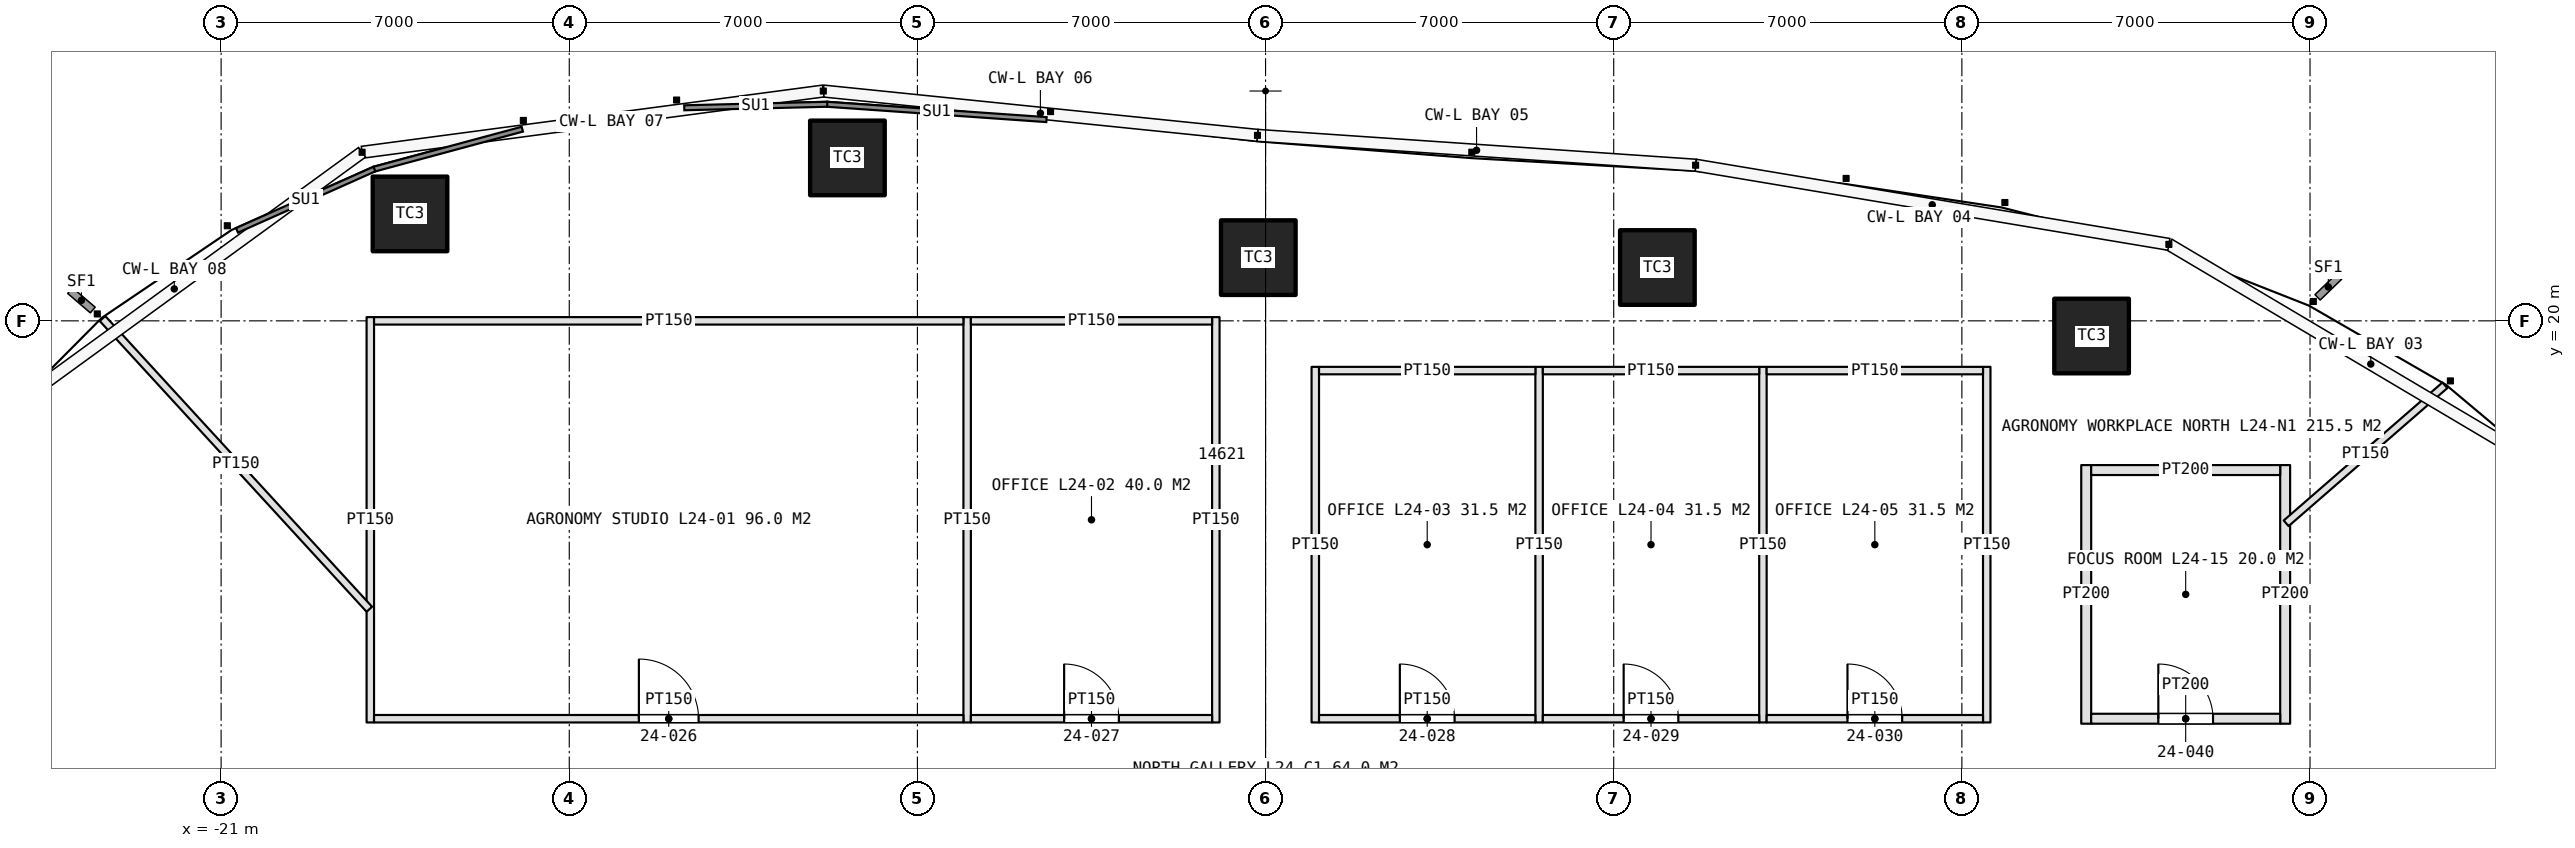
"""IFC4 building model, lengths in metres.
Left out: names, types, materials, properties, quantities, classifications, styles, units other than length and angle.
Written with IfcOpenShell. Run it as: python <this file> out.ifc"""

import sys

from ifc_helpers import new_model, si_unit, direction, frame, frame_2d, origin, origin_2d, place, context, subcontext, project, spatial, rectangle, extrude, element, fill, save


model = new_model("IFC4")
c1 = context("Model", 3, precision=1e-05, world=origin(), true_north=direction((0.0, 1.0)))
c2 = subcontext(c1, "Body", "Model", "MODEL_VIEW")
j1 = project(units=[si_unit("LENGTHUNIT", "METRE"), si_unit("PLANEANGLEUNIT", "RADIAN")], contexts=[c1])
p1 = place(None, origin())
s1 = spatial("IfcSite", under=j1, at=p1, CompositionType="ELEMENT")
p2 = place(p1, origin())
s2 = spatial("IfcBuilding", under=s1, at=p2, CompositionType="ELEMENT")
p3 = place(p2, frame((0.0, 0.0, 117.6)))
s3 = spatial("IfcBuildingStorey", under=s2, at=p3, CompositionType="ELEMENT", Elevation=117.6)
for number, where, z_axis, x_axis in (
    (1, (16.608, 19.695, 0.0), (0.0, 0.0, 1.0), (1.0, 0.0, 0.0)),
    (2, (7.878, 21.072, 0.0), (0.0, 0.0, 1.0), (1.0, 0.0, 0.0)),
    (3, (-0.146, 21.271, 0.0), (0.0, 0.0, 1.0), (1.0, 0.0, 0.0)),
    (4, (-8.407, 23.276, 0.0), (0.0, 0.0, 1.0), (1.0, 0.0, 0.0)),
    (5, (-17.202, 22.15, 0.0), (0.0, 0.0, 1.0), (1.0, 0.0, 0.0)),
):
    element("IfcColumn", number, at=place(p3, frame(where, z_axis=z_axis, x_axis=x_axis)), inside=s3, PredefinedType="COLUMN", context=c2, shape_type="SweptSolid", body=[
        extrude(rectangle(XDim=1.5, YDim=1.5, at=origin_2d()), origin(), (0.0, 0.0, 1.0), 4.2),
    ])
for number, where, z_axis, x_axis in (
    (6, (-18.0, 11.925, 0.0), (0.0, 0.0, 1.0), (0.0, 1.0, 0.0)),
    (7, (-6.0, 11.925, 0.0), (0.0, 0.0, 1.0), (0.0, 1.0, 0.0)),
    (8, (-1.0, 11.925, 0.0), (0.0, 0.0, 1.0), (0.0, 1.0, 0.0)),
):
    element("IfcWall", number, at=place(p3, frame(where, z_axis=z_axis, x_axis=x_axis)), inside=s3, PredefinedType="PARTITIONING", context=c2, shape_type="SweptSolid", body=[
        extrude(rectangle(XDim=8.15, YDim=0.15, at=frame_2d((4.075, 0.0))), origin(), (0.0, 0.0, 1.0), 3.0),
    ])
p4 = place(p3, frame((-17.925, 12.0, 0.0), z_axis=(0.0, 0.0, 1.0), x_axis=(1.0, 0.0, 0.0)))
e9 = element("IfcWall", 9, at=p4, inside=s3, PredefinedType="PARTITIONING", context=c2, shape_type="SweptSolid", body=[
    extrude(rectangle(XDim=11.85, YDim=0.15, at=frame_2d((5.925, 0.0))), origin(), (0.0, 0.0, 1.0), 3.0),
])
p5 = place(p4, frame((5.325, 0.0, 0.0)))
e10 = element("IfcOpeningElement", 10, at=p5, cuts=e9, PredefinedType="OPENING", context=c2, shape_type="SweptSolid", body=[
    extrude(rectangle(XDim=1.2, YDim=2.4, at=frame_2d((0.6, 1.2))), frame((0.0, 0.085, 0.0), z_axis=(0.0, -1.0, 0.0), x_axis=(1.0, 0.0, 0.0)), (0.0, 0.0, 1.0), 0.17),
])
p6 = place(p3, frame((-17.925, 20.0, 0.0), z_axis=(0.0, 0.0, 1.0), x_axis=(1.0, 0.0, 0.0)))
e11 = element("IfcWall", 11, at=p6, inside=s3, PredefinedType="PARTITIONING", context=c2, shape_type="SweptSolid", body=[
    extrude(rectangle(XDim=11.85, YDim=0.15, at=frame_2d((5.925, 0.0))), origin(), (0.0, 0.0, 1.0), 3.0),
])
p7 = place(p3, frame((-5.925, 12.0, 0.0), z_axis=(0.0, 0.0, 1.0), x_axis=(1.0, 0.0, 0.0)))
e12 = element("IfcWall", 12, at=p7, inside=s3, PredefinedType="PARTITIONING", context=c2, shape_type="SweptSolid", body=[
    extrude(rectangle(XDim=4.85, YDim=0.15, at=frame_2d((2.425, 0.0))), origin(), (0.0, 0.0, 1.0), 3.0),
])
p8 = place(p7, frame((1.875, 0.0, 0.0)))
e13 = element("IfcOpeningElement", 13, at=p8, cuts=e12, PredefinedType="OPENING", context=c2, shape_type="SweptSolid", body=[
    extrude(rectangle(XDim=1.1, YDim=2.3, at=frame_2d((0.55, 1.15))), frame((0.0, 0.085, 0.0), z_axis=(0.0, -1.0, 0.0), x_axis=(1.0, 0.0, 0.0)), (0.0, 0.0, 1.0), 0.17),
])
p9 = place(p3, frame((-5.925, 20.0, 0.0), z_axis=(0.0, 0.0, 1.0), x_axis=(1.0, 0.0, 0.0)))
e14 = element("IfcWall", 14, at=p9, inside=s3, PredefinedType="PARTITIONING", context=c2, shape_type="SweptSolid", body=[
    extrude(rectangle(XDim=4.85, YDim=0.15, at=frame_2d((2.425, 0.0))), origin(), (0.0, 0.0, 1.0), 3.0),
])
for number, where, z_axis, x_axis in (
    (15, (1.0, 11.925, 0.0), (0.0, 0.0, 1.0), (0.0, 1.0, 0.0)),
    (16, (5.5, 11.925, 0.0), (0.0, 0.0, 1.0), (0.0, 1.0, 0.0)),
    (17, (10.0, 11.925, 0.0), (0.0, 0.0, 1.0), (0.0, 1.0, 0.0)),
    (18, (14.5, 11.925, 0.0), (0.0, 0.0, 1.0), (0.0, 1.0, 0.0)),
):
    element("IfcWall", number, at=place(p3, frame(where, z_axis=z_axis, x_axis=x_axis)), inside=s3, PredefinedType="PARTITIONING", context=c2, shape_type="SweptSolid", body=[
        extrude(rectangle(XDim=7.15, YDim=0.15, at=frame_2d((3.575, 0.0))), origin(), (0.0, 0.0, 1.0), 3.0),
    ])
p10 = place(p3, frame((1.075, 12.0, 0.0), z_axis=(0.0, 0.0, 1.0), x_axis=(1.0, 0.0, 0.0)))
e19 = element("IfcWall", 19, at=p10, inside=s3, PredefinedType="PARTITIONING", context=c2, shape_type="SweptSolid", body=[
    extrude(rectangle(XDim=4.35, YDim=0.15, at=frame_2d((2.175, 0.0))), origin(), (0.0, 0.0, 1.0), 3.0),
])
p11 = place(p10, frame((1.625, 0.0, 0.0)))
e20 = element("IfcOpeningElement", 20, at=p11, cuts=e19, PredefinedType="OPENING", context=c2, shape_type="SweptSolid", body=[
    extrude(rectangle(XDim=1.1, YDim=2.3, at=frame_2d((0.55, 1.15))), frame((0.0, 0.085, 0.0), z_axis=(0.0, -1.0, 0.0), x_axis=(1.0, 0.0, 0.0)), (0.0, 0.0, 1.0), 0.17),
])
p12 = place(p3, frame((1.075, 19.0, 0.0), z_axis=(0.0, 0.0, 1.0), x_axis=(1.0, 0.0, 0.0)))
e21 = element("IfcWall", 21, at=p12, inside=s3, PredefinedType="PARTITIONING", context=c2, shape_type="SweptSolid", body=[
    extrude(rectangle(XDim=4.35, YDim=0.15, at=frame_2d((2.175, 0.0))), origin(), (0.0, 0.0, 1.0), 3.0),
])
p13 = place(p3, frame((5.575, 12.0, 0.0), z_axis=(0.0, 0.0, 1.0), x_axis=(1.0, 0.0, 0.0)))
e22 = element("IfcWall", 22, at=p13, inside=s3, PredefinedType="PARTITIONING", context=c2, shape_type="SweptSolid", body=[
    extrude(rectangle(XDim=4.35, YDim=0.15, at=frame_2d((2.175, 0.0))), origin(), (0.0, 0.0, 1.0), 3.0),
])
p14 = place(p13, frame((1.625, 0.0, 0.0)))
e23 = element("IfcOpeningElement", 23, at=p14, cuts=e22, PredefinedType="OPENING", context=c2, shape_type="SweptSolid", body=[
    extrude(rectangle(XDim=1.1, YDim=2.3, at=frame_2d((0.55, 1.15))), frame((0.0, 0.085, 0.0), z_axis=(0.0, -1.0, 0.0), x_axis=(1.0, 0.0, 0.0)), (0.0, 0.0, 1.0), 0.17),
])
p15 = place(p3, frame((5.575, 19.0, 0.0), z_axis=(0.0, 0.0, 1.0), x_axis=(1.0, 0.0, 0.0)))
e24 = element("IfcWall", 24, at=p15, inside=s3, PredefinedType="PARTITIONING", context=c2, shape_type="SweptSolid", body=[
    extrude(rectangle(XDim=4.35, YDim=0.15, at=frame_2d((2.175, 0.0))), origin(), (0.0, 0.0, 1.0), 3.0),
])
p16 = place(p3, frame((10.075, 12.0, 0.0), z_axis=(0.0, 0.0, 1.0), x_axis=(1.0, 0.0, 0.0)))
e25 = element("IfcWall", 25, at=p16, inside=s3, PredefinedType="PARTITIONING", context=c2, shape_type="SweptSolid", body=[
    extrude(rectangle(XDim=4.35, YDim=0.15, at=frame_2d((2.175, 0.0))), origin(), (0.0, 0.0, 1.0), 3.0),
])
p17 = place(p16, frame((1.625, 0.0, 0.0)))
e26 = element("IfcOpeningElement", 26, at=p17, cuts=e25, PredefinedType="OPENING", context=c2, shape_type="SweptSolid", body=[
    extrude(rectangle(XDim=1.1, YDim=2.3, at=frame_2d((0.55, 1.15))), frame((0.0, 0.085, 0.0), z_axis=(0.0, -1.0, 0.0), x_axis=(1.0, 0.0, 0.0)), (0.0, 0.0, 1.0), 0.17),
])
p18 = place(p3, frame((10.075, 19.0, 0.0), z_axis=(0.0, 0.0, 1.0), x_axis=(1.0, 0.0, 0.0)))
e27 = element("IfcWall", 27, at=p18, inside=s3, PredefinedType="PARTITIONING", context=c2, shape_type="SweptSolid", body=[
    extrude(rectangle(XDim=4.35, YDim=0.15, at=frame_2d((2.175, 0.0))), origin(), (0.0, 0.0, 1.0), 3.0),
])
for number, where, z_axis, x_axis in (
    (28, (16.5, 11.9, 0.0), (0.0, 0.0, 1.0), (0.0, 1.0, 0.0)),
    (29, (20.5, 11.9, 0.0), (0.0, 0.0, 1.0), (0.0, 1.0, 0.0)),
):
    element("IfcWall", number, at=place(p3, frame(where, z_axis=z_axis, x_axis=x_axis)), inside=s3, PredefinedType="PARTITIONING", context=c2, shape_type="SweptSolid", body=[
        extrude(rectangle(XDim=5.2, YDim=0.2, at=frame_2d((2.6, 0.0))), origin(), (0.0, 0.0, 1.0), 3.0),
    ])
p19 = place(p3, frame((16.6, 12.0, 0.0), z_axis=(0.0, 0.0, 1.0), x_axis=(1.0, 0.0, 0.0)))
e30 = element("IfcWall", 30, at=p19, inside=s3, PredefinedType="PARTITIONING", context=c2, shape_type="SweptSolid", body=[
    extrude(rectangle(XDim=3.8, YDim=0.2, at=frame_2d((1.9, 0.0))), origin(), (0.0, 0.0, 1.0), 3.0),
])
p20 = place(p19, frame((1.35, 0.0, 0.0)))
e31 = element("IfcOpeningElement", 31, at=p20, cuts=e30, PredefinedType="OPENING", context=c2, shape_type="SweptSolid", body=[
    extrude(rectangle(XDim=1.1, YDim=2.3, at=frame_2d((0.55, 1.15))), frame((0.0, 0.11, 0.0), z_axis=(0.0, -1.0, 0.0), x_axis=(1.0, 0.0, 0.0)), (0.0, 0.0, 1.0), 0.22),
])
p21 = place(p3, frame((16.6, 17.0, 0.0), z_axis=(0.0, 0.0, 1.0), x_axis=(1.0, 0.0, 0.0)))
e32 = element("IfcWall", 32, at=p21, inside=s3, PredefinedType="PARTITIONING", context=c2, shape_type="SweptSolid", body=[
    extrude(rectangle(XDim=3.8, YDim=0.2, at=frame_2d((1.9, 0.0))), origin(), (0.0, 0.0, 1.0), 3.0),
])
p22 = place(p3, frame((-18.02, 14.201, 0.0), z_axis=(0.0, 0.0, 1.0), x_axis=(-0.676162058246, 0.736752923977, 0.0)))
e33 = element("IfcWall", 33, at=p22, inside=s3, PredefinedType="PARTITIONING", context=c2, shape_type="SweptSolid", body=[
    extrude(rectangle(XDim=7.934, YDim=0.15, at=frame_2d((3.967, 0.0))), origin(), (0.0, 0.0, 1.0), 3.0),
])
p23 = place(p3, frame((20.52, 15.929, 0.0), z_axis=(0.0, 0.0, 1.0), x_axis=(0.754686299234, 0.656085809745, 0.0)))
e34 = element("IfcWall", 34, at=p23, inside=s3, PredefinedType="PARTITIONING", context=c2, shape_type="SweptSolid", body=[
    extrude(rectangle(XDim=4.229, YDim=0.15, at=frame_2d((2.115, 0.0))), origin(), (0.0, 0.0, 1.0), 3.0),
])
p24 = place(p5, origin())
e35 = element("IfcDoor", 35, at=p24, inside=s3, OperationType="SINGLE_SWING_LEFT", PredefinedType="DOOR", context=c2, shape_type="SweptSolid", body=[
    extrude(rectangle(XDim=1.2, YDim=2.4, at=frame_2d((0.6, 1.2))), frame((0.0, 0.025, 0.0), z_axis=(0.0, -1.0, 0.0), x_axis=(1.0, 0.0, 0.0)), (0.0, 0.0, 1.0), 0.05),
])
fill(e10, e35)
p25 = place(p8, origin())
e36 = element("IfcDoor", 36, at=p25, inside=s3, OperationType="SINGLE_SWING_LEFT", PredefinedType="DOOR", context=c2, shape_type="SweptSolid", body=[
    extrude(rectangle(XDim=1.1, YDim=2.3, at=frame_2d((0.55, 1.15))), frame((0.0, 0.025, 0.0), z_axis=(0.0, -1.0, 0.0), x_axis=(1.0, 0.0, 0.0)), (0.0, 0.0, 1.0), 0.05),
])
fill(e13, e36)
p26 = place(p11, origin())
e37 = element("IfcDoor", 37, at=p26, inside=s3, OperationType="SINGLE_SWING_LEFT", PredefinedType="DOOR", context=c2, shape_type="SweptSolid", body=[
    extrude(rectangle(XDim=1.1, YDim=2.3, at=frame_2d((0.55, 1.15))), frame((0.0, 0.025, 0.0), z_axis=(0.0, -1.0, 0.0), x_axis=(1.0, 0.0, 0.0)), (0.0, 0.0, 1.0), 0.05),
])
fill(e20, e37)
p27 = place(p14, origin())
e38 = element("IfcDoor", 38, at=p27, inside=s3, OperationType="SINGLE_SWING_LEFT", PredefinedType="DOOR", context=c2, shape_type="SweptSolid", body=[
    extrude(rectangle(XDim=1.1, YDim=2.3, at=frame_2d((0.55, 1.15))), frame((0.0, 0.025, 0.0), z_axis=(0.0, -1.0, 0.0), x_axis=(1.0, 0.0, 0.0)), (0.0, 0.0, 1.0), 0.05),
])
fill(e23, e38)
p28 = place(p17, origin())
e39 = element("IfcDoor", 39, at=p28, inside=s3, OperationType="SINGLE_SWING_LEFT", PredefinedType="DOOR", context=c2, shape_type="SweptSolid", body=[
    extrude(rectangle(XDim=1.1, YDim=2.3, at=frame_2d((0.55, 1.15))), frame((0.0, 0.025, 0.0), z_axis=(0.0, -1.0, 0.0), x_axis=(1.0, 0.0, 0.0)), (0.0, 0.0, 1.0), 0.05),
])
fill(e26, e39)
p29 = place(p20, origin())
e40 = element("IfcDoor", 40, at=p29, inside=s3, OperationType="SINGLE_SWING_LEFT", PredefinedType="DOOR", context=c2, shape_type="SweptSolid", body=[
    extrude(rectangle(XDim=1.1, YDim=2.3, at=frame_2d((0.55, 1.15))), frame((0.0, 0.025, 0.0), z_axis=(0.0, -1.0, 0.0), x_axis=(1.0, 0.0, 0.0)), (0.0, 0.0, 1.0), 0.05),
])
fill(e31, e40)
save(model, sys.argv[1])
